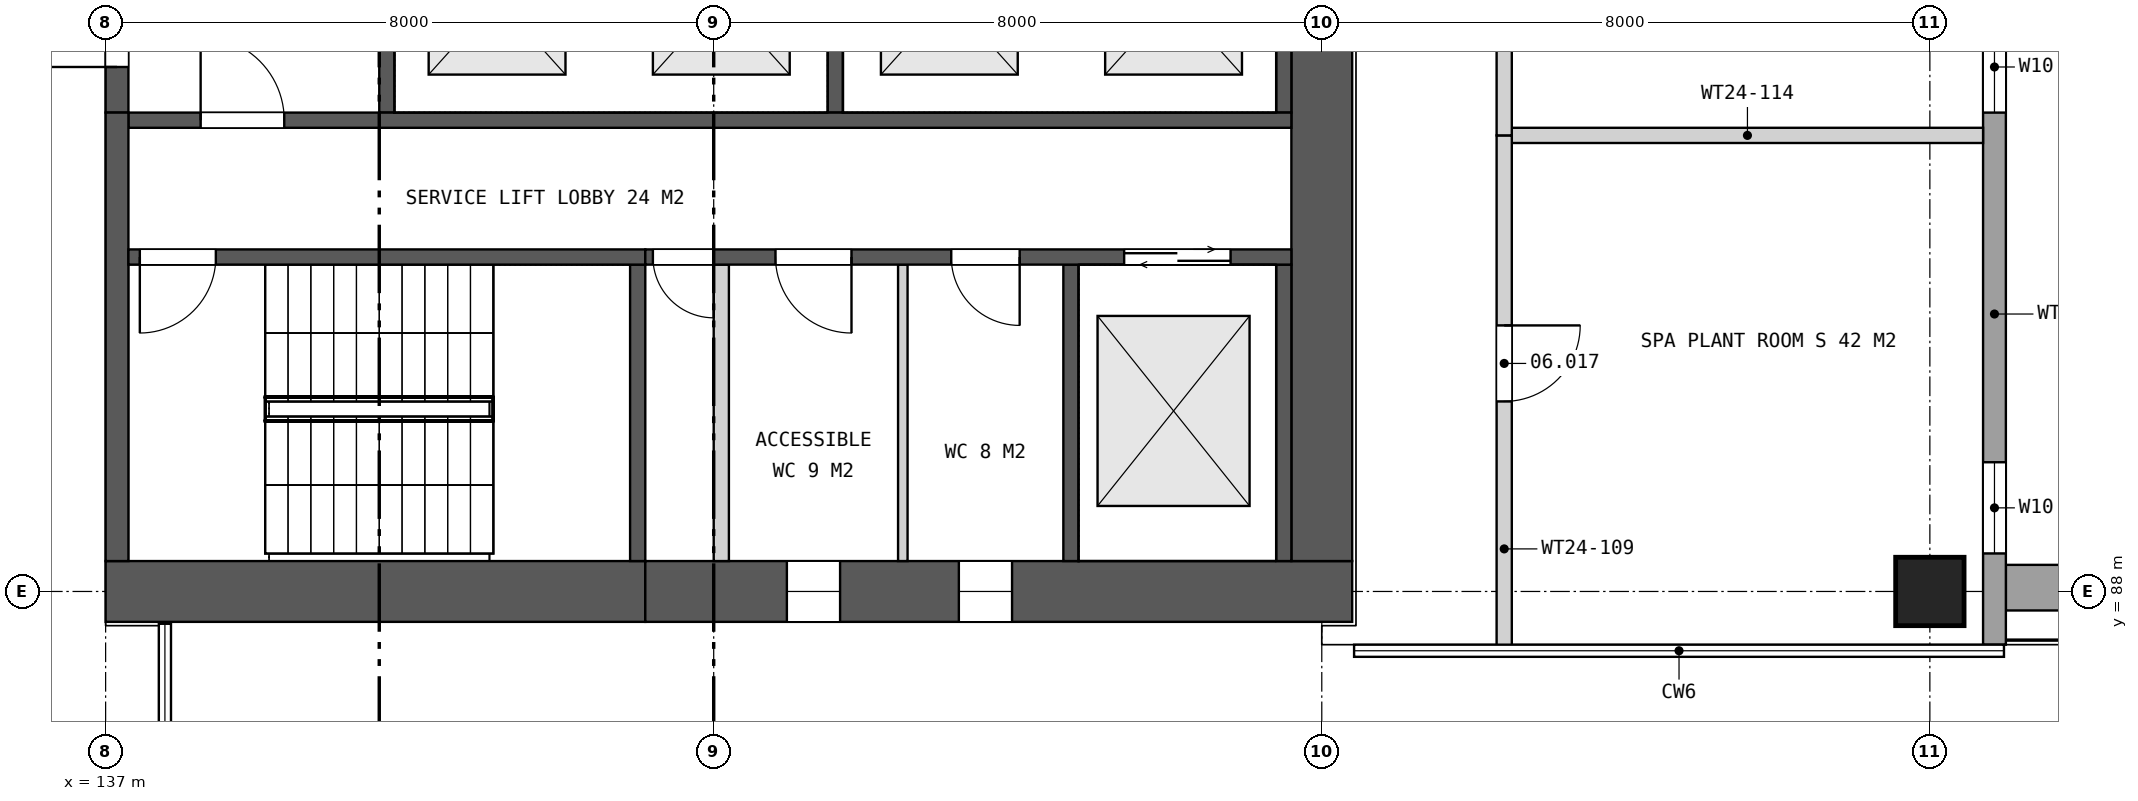
"""IFC4 building model, lengths in metres.
Left out: names, types, materials, properties, quantities, classifications, styles, units other than length and angle.
Written with IfcOpenShell. Run it as: python <this file> out.ifc"""

import sys

from ifc_helpers import new_model, si_unit, direction, frame, frame_2d, origin, origin_2d, place, context, subcontext, project, spatial, rectangle, extrude, element, fill, save


model = new_model("IFC4")
c1 = context("Model", 3, precision=1e-05, world=origin(), true_north=direction((0.0, 1.0)))
c2 = subcontext(c1, "Body", "Model", "MODEL_VIEW")
j1 = project(units=[si_unit("LENGTHUNIT", "METRE"), si_unit("PLANEANGLEUNIT", "RADIAN")], contexts=[c1])
p1 = place(None, origin())
s1 = spatial("IfcSite", under=j1, at=p1, CompositionType="ELEMENT")
p2 = place(p1, origin())
s2 = spatial("IfcBuilding", under=s1, at=p2, CompositionType="ELEMENT")
p3 = place(p2, frame((0.0, 0.0, 47.5)))
s3 = spatial("IfcBuildingStorey", under=s2, at=p3, CompositionType="ELEMENT", Elevation=47.5)
p4 = place(p3, frame((161.0, 88.0, 0.0), z_axis=(0.0, 0.0, 1.0), x_axis=(1.0, 0.0, 0.0)))
e1 = element("IfcColumn", 1, at=p4, inside=s3, PredefinedType="COLUMN", context=c2, shape_type="SweptSolid", body=[
    extrude(rectangle(XDim=0.9, YDim=0.9, at=origin_2d()), origin(), (0.0, 0.0, 1.0), 6.0),
])
p5 = place(p3, frame((137.0, 88.0, 0.0), z_axis=(0.0, 0.0, 1.0), x_axis=(1.0, 0.0, 0.0)))
e2 = element("IfcWall", 2, at=p5, inside=s3, PredefinedType="SHEAR", context=c2, shape_type="SweptSolid", body=[
    extrude(rectangle(XDim=7.1, YDim=0.8, at=frame_2d((3.55, 0.0))), origin(), (0.0, 0.0, 1.0), 6.0),
])
p6 = place(p3, frame((144.1, 88.0, 0.0), z_axis=(0.0, 0.0, 1.0), x_axis=(1.0, 0.0, 0.0)))
e3 = element("IfcWall", 3, at=p6, inside=s3, PredefinedType="SHEAR", context=c2, shape_type="SweptSolid", body=[
    extrude(rectangle(XDim=9.3, YDim=0.8, at=frame_2d((4.65, 0.0))), origin(), (0.0, 0.0, 1.0), 6.0),
])
p7 = place(p6, frame((1.863, 0.0, 1.5)))
e4 = element("IfcOpeningElement", 4, at=p7, cuts=e3, PredefinedType="OPENING", context=c2, shape_type="SweptSolid", body=[
    extrude(rectangle(XDim=0.7, YDim=0.9, at=frame_2d((0.35, 0.45))), frame((0.0, 0.41, 0.0), z_axis=(0.0, -1.0, 0.0), x_axis=(1.0, 0.0, 0.0)), (0.0, 0.0, 1.0), 0.82),
])
p8 = place(p6, frame((4.125, 0.0, 1.5)))
e5 = element("IfcOpeningElement", 5, at=p8, cuts=e3, PredefinedType="OPENING", context=c2, shape_type="SweptSolid", body=[
    extrude(rectangle(XDim=0.7, YDim=0.9, at=frame_2d((0.35, 0.45))), frame((0.0, 0.41, 0.0), z_axis=(0.0, -1.0, 0.0), x_axis=(1.0, 0.0, 0.0)), (0.0, 0.0, 1.0), 0.82),
])
p9 = place(p3, frame((153.0, 88.4, 0.0), z_axis=(0.0, 0.0, 1.0), x_axis=(0.0, 1.0, 0.0)))
e6 = element("IfcWall", 6, at=p9, inside=s3, PredefinedType="SHEAR", context=c2, shape_type="SweptSolid", body=[
    extrude(rectangle(XDim=23.2, YDim=0.8, at=frame_2d((11.6, 0.0))), origin(), (0.0, 0.0, 1.0), 6.0),
])
p10 = place(p9, frame((10.4, 0.0, 0.0)))
e7 = element("IfcOpeningElement", 7, at=p10, cuts=e6, PredefinedType="OPENING", context=c2, shape_type="SweptSolid", body=[
    extrude(rectangle(XDim=2.4, YDim=2.4, at=frame_2d((1.2, 1.2))), frame((0.0, 0.41, 0.0), z_axis=(0.0, -1.0, 0.0), x_axis=(1.0, 0.0, 0.0)), (0.0, 0.0, 1.0), 0.82),
])
p11 = place(p3, frame((137.15, 94.3, 0.0), z_axis=(0.0, 0.0, 1.0), x_axis=(0.0, 1.0, 0.0)))
e8 = element("IfcWall", 8, at=p11, inside=s3, PredefinedType="SHEAR", context=c2, shape_type="SweptSolid", body=[
    extrude(rectangle(XDim=11.4, YDim=0.3, at=frame_2d((5.7, 0.0))), origin(), (0.0, 0.0, 1.0), 6.0),
])
p12 = place(p11, frame((0.6, 0.0, 0.0)))
e9 = element("IfcOpeningElement", 9, at=p12, cuts=e8, PredefinedType="OPENING", context=c2, shape_type="SweptSolid", body=[
    extrude(rectangle(XDim=2.4, YDim=2.4, at=frame_2d((1.2, 1.2))), frame((0.0, 0.16, 0.0), z_axis=(0.0, -1.0, 0.0), x_axis=(1.0, 0.0, 0.0)), (0.0, 0.0, 1.0), 0.32),
])
p13 = place(p11, frame((4.5, 0.0, 0.0)))
e10 = element("IfcOpeningElement", 10, at=p13, cuts=e8, PredefinedType="OPENING", context=c2, shape_type="SweptSolid", body=[
    extrude(rectangle(XDim=2.4, YDim=2.4, at=frame_2d((1.2, 1.2))), frame((0.0, 0.16, 0.0), z_axis=(0.0, -1.0, 0.0), x_axis=(1.0, 0.0, 0.0)), (0.0, 0.0, 1.0), 0.32),
])
p14 = place(p11, frame((8.4, 0.0, 0.0)))
e11 = element("IfcOpeningElement", 11, at=p14, cuts=e8, PredefinedType="OPENING", context=c2, shape_type="SweptSolid", body=[
    extrude(rectangle(XDim=2.4, YDim=2.4, at=frame_2d((1.2, 1.2))), frame((0.0, 0.16, 0.0), z_axis=(0.0, -1.0, 0.0), x_axis=(1.0, 0.0, 0.0)), (0.0, 0.0, 1.0), 0.32),
])
for number, where, z_axis, x_axis in (
    (12, (140.7, 94.3, 0.0), (0.0, 0.0, 1.0), (0.0, 1.0, 0.0)),
    (13, (146.6, 94.3, 0.0), (0.0, 0.0, 1.0), (0.0, 1.0, 0.0)),
    (14, (152.5, 94.3, 0.0), (0.0, 0.0, 1.0), (0.0, 1.0, 0.0)),
):
    element("IfcWall", number, at=place(p3, frame(where, z_axis=z_axis, x_axis=x_axis)), inside=s3, PredefinedType="SHEAR", context=c2, shape_type="SweptSolid", body=[
        extrude(rectangle(XDim=3.0, YDim=0.2, at=frame_2d((1.5, 0.0))), origin(), (0.0, 0.0, 1.0), 6.0),
    ])
p15 = place(p3, frame((137.3, 94.2, 0.0), z_axis=(0.0, 0.0, 1.0), x_axis=(1.0, 0.0, 0.0)))
e15 = element("IfcWall", 15, at=p15, inside=s3, PredefinedType="SHEAR", context=c2, shape_type="SweptSolid", body=[
    extrude(rectangle(XDim=15.3, YDim=0.2, at=frame_2d((7.65, 0.0))), origin(), (0.0, 0.0, 1.0), 6.0),
])
p16 = place(p15, frame((0.95, 0.0, 0.0)))
e16 = element("IfcOpeningElement", 16, at=p16, cuts=e15, PredefinedType="OPENING", context=c2, shape_type="SweptSolid", body=[
    extrude(rectangle(XDim=1.1, YDim=2.1, at=frame_2d((0.55, 1.05))), frame((0.0, 0.11, 0.0), z_axis=(0.0, -1.0, 0.0), x_axis=(1.0, 0.0, 0.0)), (0.0, 0.0, 1.0), 0.22),
])
p17 = place(p3, frame((137.15, 88.4, 0.0), z_axis=(0.0, 0.0, 1.0), x_axis=(0.0, 1.0, 0.0)))
e17 = element("IfcWall", 17, at=p17, inside=s3, PredefinedType="SHEAR", context=c2, shape_type="SweptSolid", body=[
    extrude(rectangle(XDim=5.9, YDim=0.3, at=frame_2d((2.95, 0.0))), origin(), (0.0, 0.0, 1.0), 6.0),
])
for number, where, z_axis, x_axis in (
    (18, (144.0, 88.4, 0.0), (0.0, 0.0, 1.0), (0.0, 1.0, 0.0)),
    (19, (149.7, 88.4, 0.0), (0.0, 0.0, 1.0), (0.0, 1.0, 0.0)),
    (20, (152.5, 88.4, 0.0), (0.0, 0.0, 1.0), (0.0, 1.0, 0.0)),
):
    element("IfcWall", number, at=place(p3, frame(where, z_axis=z_axis, x_axis=x_axis)), inside=s3, PredefinedType="SHEAR", context=c2, shape_type="SweptSolid", body=[
        extrude(rectangle(XDim=3.9, YDim=0.2, at=frame_2d((1.95, 0.0))), origin(), (0.0, 0.0, 1.0), 6.0),
    ])
p18 = place(p3, frame((145.1, 88.4, 0.0), z_axis=(0.0, 0.0, 1.0), x_axis=(0.0, 1.0, 0.0)))
e21 = element("IfcWall", 21, at=p18, inside=s3, PredefinedType="PARTITIONING", context=c2, shape_type="SweptSolid", body=[
    extrude(rectangle(XDim=3.9, YDim=0.2, at=frame_2d((1.95, 0.0))), origin(), (0.0, 0.0, 1.0), 6.0),
])
p19 = place(p3, frame((147.488, 88.4, 0.0), z_axis=(0.0, 0.0, 1.0), x_axis=(0.0, 1.0, 0.0)))
e22 = element("IfcWall", 22, at=p19, inside=s3, PredefinedType="PARTITIONING", context=c2, shape_type="SweptSolid", body=[
    extrude(rectangle(XDim=3.9, YDim=0.125, at=frame_2d((1.95, 0.0))), origin(), (0.0, 0.0, 1.0), 6.0),
])
p20 = place(p3, frame((137.3, 92.4, 0.0), z_axis=(0.0, 0.0, 1.0), x_axis=(1.0, 0.0, 0.0)))
e23 = element("IfcWall", 23, at=p20, inside=s3, PredefinedType="SHEAR", context=c2, shape_type="SweptSolid", body=[
    extrude(rectangle(XDim=6.8, YDim=0.2, at=frame_2d((3.4, 0.0))), origin(), (0.0, 0.0, 1.0), 6.0),
])
p21 = place(p20, frame((0.15, 0.0, 0.0)))
e24 = element("IfcOpeningElement", 24, at=p21, cuts=e23, PredefinedType="OPENING", context=c2, shape_type="SweptSolid", body=[
    extrude(rectangle(XDim=1.0, YDim=2.1, at=frame_2d((0.5, 1.05))), frame((0.0, 0.11, 0.0), z_axis=(0.0, -1.0, 0.0), x_axis=(1.0, 0.0, 0.0)), (0.0, 0.0, 1.0), 0.22),
])
p22 = place(p3, frame((144.1, 92.4, 0.0), z_axis=(0.0, 0.0, 1.0), x_axis=(1.0, 0.0, 0.0)))
e25 = element("IfcWall", 25, at=p22, inside=s3, PredefinedType="SHEAR", context=c2, shape_type="SweptSolid", body=[
    extrude(rectangle(XDim=8.5, YDim=0.2, at=frame_2d((4.25, 0.0))), origin(), (0.0, 0.0, 1.0), 6.0),
])
p23 = place(p22, frame((0.1, 0.0, 0.0)))
e26 = element("IfcOpeningElement", 26, at=p23, cuts=e25, PredefinedType="OPENING", context=c2, shape_type="SweptSolid", body=[
    extrude(rectangle(XDim=0.8, YDim=2.1, at=frame_2d((0.4, 1.05))), frame((0.0, 0.11, 0.0), z_axis=(0.0, -1.0, 0.0), x_axis=(1.0, 0.0, 0.0)), (0.0, 0.0, 1.0), 0.22),
])
p24 = place(p22, frame((1.713, 0.0, 0.0)))
e27 = element("IfcOpeningElement", 27, at=p24, cuts=e25, PredefinedType="OPENING", context=c2, shape_type="SweptSolid", body=[
    extrude(rectangle(XDim=1.0, YDim=2.1, at=frame_2d((0.5, 1.05))), frame((0.0, 0.11, 0.0), z_axis=(0.0, -1.0, 0.0), x_axis=(1.0, 0.0, 0.0)), (0.0, 0.0, 1.0), 0.22),
])
p25 = place(p22, frame((4.025, 0.0, 0.0)))
e28 = element("IfcOpeningElement", 28, at=p25, cuts=e25, PredefinedType="OPENING", context=c2, shape_type="SweptSolid", body=[
    extrude(rectangle(XDim=0.9, YDim=2.1, at=frame_2d((0.45, 1.05))), frame((0.0, 0.11, 0.0), z_axis=(0.0, -1.0, 0.0), x_axis=(1.0, 0.0, 0.0)), (0.0, 0.0, 1.0), 0.22),
])
p26 = place(p22, frame((6.3, 0.0, 0.0)))
e29 = element("IfcOpeningElement", 29, at=p26, cuts=e25, PredefinedType="OPENING", context=c2, shape_type="SweptSolid", body=[
    extrude(rectangle(XDim=1.4, YDim=2.1, at=frame_2d((0.7, 1.05))), frame((0.0, 0.11, 0.0), z_axis=(0.0, -1.0, 0.0), x_axis=(1.0, 0.0, 0.0)), (0.0, 0.0, 1.0), 0.22),
])
p27 = place(p3, frame((168.65, 88.05, 0.0), z_axis=(0.0, 0.0, 1.0), x_axis=(-1.0, 0.0, 0.0)))
e30 = element("IfcWall", 30, at=p27, inside=s3, PredefinedType="SOLIDWALL", context=c2, shape_type="SweptSolid", body=[
    extrude(rectangle(XDim=6.65, YDim=0.6, at=frame_2d((3.325, 0.0))), origin(), (0.0, 0.0, 1.0), 0.6),
])
p28 = place(p3, frame((161.85, 87.3, 0.0), z_axis=(0.0, 0.0, 1.0), x_axis=(0.0, 1.0, 0.0)))
e31 = element("IfcWall", 31, at=p28, inside=s3, PredefinedType="SOLIDWALL", context=c2, shape_type="SweptSolid", body=[
    extrude(rectangle(XDim=8.7, YDim=0.3, at=frame_2d((4.35, 0.0))), origin(), (0.0, 0.0, 1.0), 5.256),
])
p29 = place(p28, frame((1.2, 0.0, 0.4)))
e32 = element("IfcOpeningElement", 32, at=p29, cuts=e31, PredefinedType="OPENING", context=c2, shape_type="SweptSolid", body=[
    extrude(rectangle(XDim=1.2, YDim=2.2, at=frame_2d((0.6, 1.1))), frame((0.0, 0.16, 0.0), z_axis=(0.0, -1.0, 0.0), x_axis=(1.0, 0.0, 0.0)), (0.0, 0.0, 1.0), 0.32),
])
p30 = place(p28, frame((7.0, 0.0, 0.4)))
e33 = element("IfcOpeningElement", 33, at=p30, cuts=e31, PredefinedType="OPENING", context=c2, shape_type="SweptSolid", body=[
    extrude(rectangle(XDim=1.2, YDim=2.2, at=frame_2d((0.6, 1.1))), frame((0.0, 0.16, 0.0), z_axis=(0.0, -1.0, 0.0), x_axis=(1.0, 0.0, 0.0)), (0.0, 0.0, 1.0), 0.32),
])
p31 = place(p3, frame((155.5, 94.0, 0.0), z_axis=(0.0, 0.0, 1.0), x_axis=(1.0, 0.0, 0.0)))
e34 = element("IfcWall", 34, at=p31, inside=s3, PredefinedType="SOLIDWALL", context=c2, shape_type="SweptSolid", body=[
    extrude(rectangle(XDim=6.2, YDim=0.2, at=frame_2d((3.1, 0.0))), origin(), (0.0, 0.0, 1.0), 2.7),
])
p32 = place(p3, frame((155.4, 87.2, 0.0), z_axis=(0.0, 0.0, 1.0), x_axis=(0.0, 1.0, 0.0)))
e35 = element("IfcWall", 35, at=p32, inside=s3, PredefinedType="SOLIDWALL", context=c2, shape_type="SweptSolid", body=[
    extrude(rectangle(XDim=6.8, YDim=0.2, at=frame_2d((3.4, 0.0))), origin(), (0.0, 0.0, 1.0), 5.263),
])
p33 = place(p32, frame((3.3, 0.0, 0.0)))
e36 = element("IfcOpeningElement", 36, at=p33, cuts=e35, PredefinedType="OPENING", context=c2, shape_type="SweptSolid", body=[
    extrude(rectangle(XDim=1.0, YDim=2.2, at=frame_2d((0.5, 1.1))), frame((0.0, 0.11, 0.0), z_axis=(0.0, -1.0, 0.0), x_axis=(1.0, 0.0, 0.0)), (0.0, 0.0, 1.0), 0.22),
])
p34 = place(p3, frame((155.4, 94.0, 0.0), z_axis=(0.0, 0.0, 1.0), x_axis=(0.0, 1.0, 0.0)))
e37 = element("IfcWall", 37, at=p34, inside=s3, PredefinedType="PARTITIONING", context=c2, shape_type="SweptSolid", body=[
    extrude(rectangle(XDim=12.0, YDim=0.2, at=frame_2d((6.0, 0.0))), origin(), (0.0, 0.0, 1.0), 5.256),
])
p35 = place(p34, frame((5.1, 0.0, 0.0)))
e38 = element("IfcOpeningElement", 38, at=p35, cuts=e37, PredefinedType="OPENING", context=c2, shape_type="SweptSolid", body=[
    extrude(rectangle(XDim=1.8, YDim=2.4, at=frame_2d((0.9, 1.2))), frame((0.0, 0.11, 0.0), z_axis=(0.0, -1.0, 0.0), x_axis=(1.0, 0.0, 0.0)), (0.0, 0.0, 1.0), 0.22),
])
p36 = place(p7, origin())
e39 = element("IfcWindow", 39, at=p36, inside=s3, PartitioningType="SINGLE_PANEL", PredefinedType="WINDOW", context=c2, shape_type="SweptSolid", body=[
    extrude(rectangle(XDim=0.7, YDim=0.9, at=frame_2d((0.35, 0.45))), frame((0.0, 0.03, 0.0), z_axis=(0.0, -1.0, 0.0), x_axis=(1.0, 0.0, 0.0)), (0.0, 0.0, 1.0), 0.06),
])
fill(e4, e39)
p37 = place(p8, origin())
e40 = element("IfcWindow", 40, at=p37, inside=s3, PartitioningType="SINGLE_PANEL", PredefinedType="WINDOW", context=c2, shape_type="SweptSolid", body=[
    extrude(rectangle(XDim=0.7, YDim=0.9, at=frame_2d((0.35, 0.45))), frame((0.0, 0.03, 0.0), z_axis=(0.0, -1.0, 0.0), x_axis=(1.0, 0.0, 0.0)), (0.0, 0.0, 1.0), 0.06),
])
fill(e5, e40)
p38 = place(p12, origin())
e41 = element("IfcDoor", 41, at=p38, inside=s3, OperationType="DOUBLE_DOOR_SINGLE_SWING", PredefinedType="DOOR", context=c2, shape_type="SweptSolid", body=[
    extrude(rectangle(XDim=2.4, YDim=2.4, at=frame_2d((1.2, 1.2))), frame((0.0, 0.025, 0.0), z_axis=(0.0, -1.0, 0.0), x_axis=(1.0, 0.0, 0.0)), (0.0, 0.0, 1.0), 0.05),
])
fill(e9, e41)
p39 = place(p16, origin())
e42 = element("IfcDoor", 42, at=p39, inside=s3, OperationType="SINGLE_SWING_LEFT", PredefinedType="DOOR", context=c2, shape_type="SweptSolid", body=[
    extrude(rectangle(XDim=1.1, YDim=2.1, at=frame_2d((0.55, 1.05))), frame((0.0, 0.025, 0.0), z_axis=(0.0, -1.0, 0.0), x_axis=(1.0, 0.0, 0.0)), (0.0, 0.0, 1.0), 0.05),
])
fill(e16, e42)
p40 = place(p21, frame((1.0, 0.0, 0.0), z_axis=(0.0, 0.0, 1.0), x_axis=(-1.0, 0.0, 0.0)))
e43 = element("IfcDoor", 43, at=p40, inside=s3, OperationType="SINGLE_SWING_RIGHT", PredefinedType="DOOR", context=c2, shape_type="SweptSolid", body=[
    extrude(rectangle(XDim=1.0, YDim=2.1, at=frame_2d((0.5, 1.05))), frame((0.0, 0.025, 0.0), z_axis=(0.0, -1.0, 0.0), x_axis=(1.0, 0.0, 0.0)), (0.0, 0.0, 1.0), 0.05),
])
fill(e24, e43)
p41 = place(p23, frame((0.8, 0.0, 0.0), z_axis=(0.0, 0.0, 1.0), x_axis=(-1.0, 0.0, 0.0)))
e44 = element("IfcDoor", 44, at=p41, inside=s3, OperationType="SINGLE_SWING_LEFT", PredefinedType="DOOR", context=c2, shape_type="SweptSolid", body=[
    extrude(rectangle(XDim=0.8, YDim=2.1, at=frame_2d((0.4, 1.05))), frame((0.0, 0.025, 0.0), z_axis=(0.0, -1.0, 0.0), x_axis=(1.0, 0.0, 0.0)), (0.0, 0.0, 1.0), 0.05),
])
fill(e26, e44)
p42 = place(p24, frame((1.0, 0.0, 0.0), z_axis=(0.0, 0.0, 1.0), x_axis=(-1.0, 0.0, 0.0)))
e45 = element("IfcDoor", 45, at=p42, inside=s3, OperationType="SINGLE_SWING_LEFT", PredefinedType="DOOR", context=c2, shape_type="SweptSolid", body=[
    extrude(rectangle(XDim=1.0, YDim=2.1, at=frame_2d((0.5, 1.05))), frame((0.0, 0.025, 0.0), z_axis=(0.0, -1.0, 0.0), x_axis=(1.0, 0.0, 0.0)), (0.0, 0.0, 1.0), 0.05),
])
fill(e27, e45)
p43 = place(p25, frame((0.9, 0.0, 0.0), z_axis=(0.0, 0.0, 1.0), x_axis=(-1.0, 0.0, 0.0)))
e46 = element("IfcDoor", 46, at=p43, inside=s3, OperationType="SINGLE_SWING_LEFT", PredefinedType="DOOR", context=c2, shape_type="SweptSolid", body=[
    extrude(rectangle(XDim=0.9, YDim=2.1, at=frame_2d((0.45, 1.05))), frame((0.0, 0.025, 0.0), z_axis=(0.0, -1.0, 0.0), x_axis=(1.0, 0.0, 0.0)), (0.0, 0.0, 1.0), 0.05),
])
fill(e28, e46)
p44 = place(p26, origin())
e47 = element("IfcDoor", 47, at=p44, inside=s3, OperationType="DOUBLE_DOOR_SLIDING", PredefinedType="DOOR", context=c2, shape_type="SweptSolid", body=[
    extrude(rectangle(XDim=1.4, YDim=2.1, at=frame_2d((0.7, 1.05))), frame((0.0, 0.025, 0.0), z_axis=(0.0, -1.0, 0.0), x_axis=(1.0, 0.0, 0.0)), (0.0, 0.0, 1.0), 0.05),
])
fill(e29, e47)
p45 = place(p29, origin())
e48 = element("IfcWindow", 48, at=p45, inside=s3, PartitioningType="SINGLE_PANEL", PredefinedType="WINDOW", context=c2, shape_type="SweptSolid", body=[
    extrude(rectangle(XDim=1.2, YDim=2.2, at=frame_2d((0.6, 1.1))), frame((0.0, 0.03, 0.0), z_axis=(0.0, -1.0, 0.0), x_axis=(1.0, 0.0, 0.0)), (0.0, 0.0, 1.0), 0.06),
])
fill(e32, e48)
p46 = place(p30, origin())
e49 = element("IfcWindow", 49, at=p46, inside=s3, PartitioningType="SINGLE_PANEL", PredefinedType="WINDOW", context=c2, shape_type="SweptSolid", body=[
    extrude(rectangle(XDim=1.2, YDim=2.2, at=frame_2d((0.6, 1.1))), frame((0.0, 0.03, 0.0), z_axis=(0.0, -1.0, 0.0), x_axis=(1.0, 0.0, 0.0)), (0.0, 0.0, 1.0), 0.06),
])
fill(e33, e49)
p47 = place(p33, frame((1.0, 0.0, 0.0), z_axis=(0.0, 0.0, 1.0), x_axis=(-1.0, 0.0, 0.0)))
e50 = element("IfcDoor", 50, at=p47, inside=s3, OperationType="SINGLE_SWING_LEFT", PredefinedType="DOOR", context=c2, shape_type="SweptSolid", body=[
    extrude(rectangle(XDim=1.0, YDim=2.2, at=frame_2d((0.5, 1.1))), frame((0.0, 0.025, 0.0), z_axis=(0.0, -1.0, 0.0), x_axis=(1.0, 0.0, 0.0)), (0.0, 0.0, 1.0), 0.05),
])
fill(e36, e50)
save(model, sys.argv[1])
